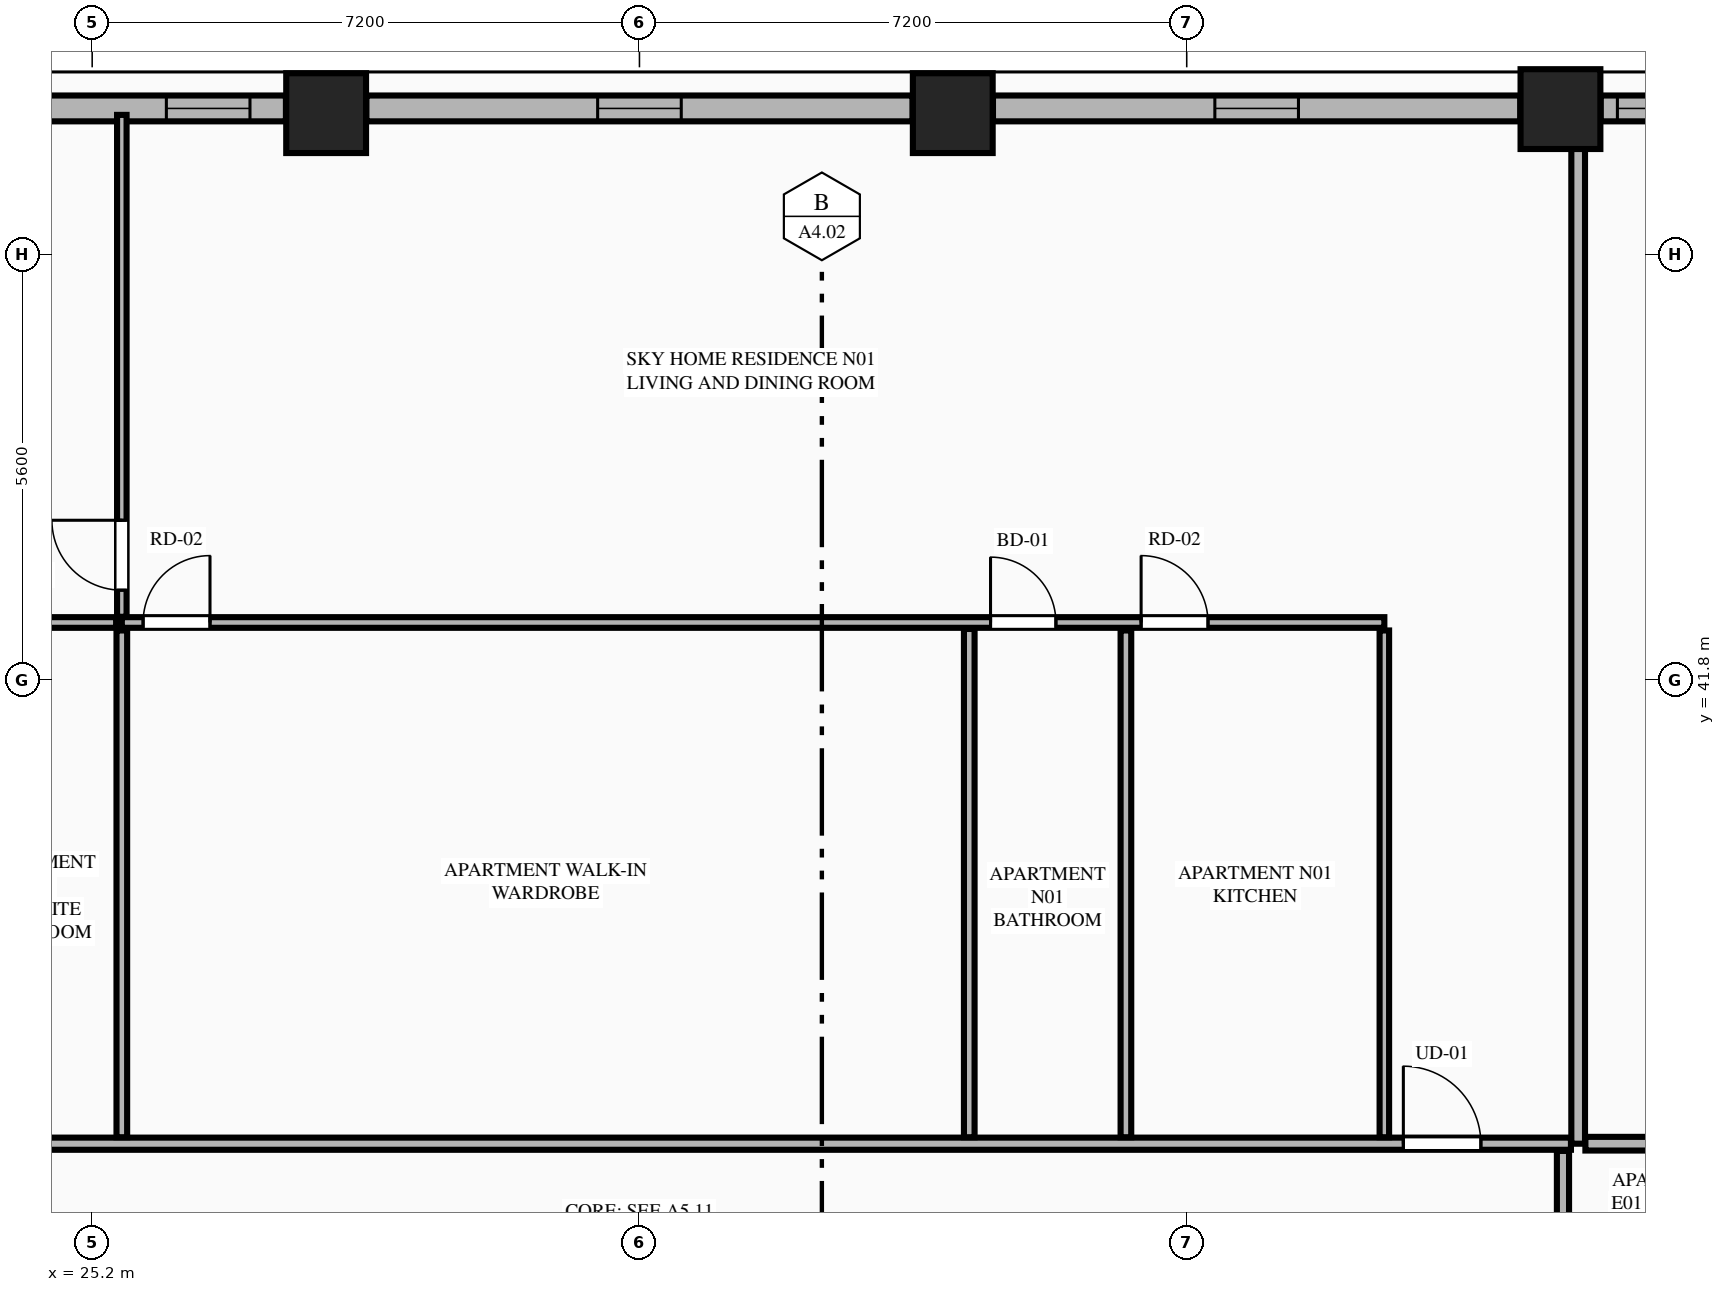
"""IFC4 building model, lengths in metres.
Left out: names, types, materials, properties, quantities, classifications, styles, units other than length and angle.
Written with IfcOpenShell. Run it as: python <this file> out.ifc"""

import sys

from ifc_helpers import new_model, si_unit, direction, frame, frame_2d, origin, origin_2d, place, context, subcontext, project, spatial, rectangle, extrude, element, fill, save


model = new_model("IFC4")
c1 = context("Model", 3, precision=1e-05, world=origin(), true_north=direction((0.0, 1.0)))
c2 = subcontext(c1, "Body", "Model", "MODEL_VIEW")
j1 = project(units=[si_unit("LENGTHUNIT", "METRE"), si_unit("PLANEANGLEUNIT", "RADIAN")], contexts=[c1])
p1 = place(None, origin())
s1 = spatial("IfcSite", under=j1, at=p1, CompositionType="ELEMENT")
p2 = place(p1, origin())
s2 = spatial("IfcBuilding", under=s1, at=p2, CompositionType="ELEMENT")
p3 = place(p2, frame((0.0, 0.0, 83.55)))
s3 = spatial("IfcBuildingStorey", under=s2, at=p3, CompositionType="ELEMENT", Elevation=83.55)
for number, where, z_axis, x_axis in (
    (1, (44.517, 49.311, 0.0), (0.0, 0.0, 1.0), (1.0, 0.0, 0.0)),
    (2, (36.522, 49.258, 0.0), (0.0, 0.0, 1.0), (1.0, 0.0, 0.0)),
    (3, (28.278, 49.258, 0.0), (0.0, 0.0, 1.0), (1.0, 0.0, 0.0)),
):
    element("IfcColumn", number, at=place(p3, frame(where, z_axis=z_axis, x_axis=x_axis)), inside=s3, PredefinedType="COLUMN", context=c2, shape_type="SweptSolid", body=[
        extrude(rectangle(XDim=1.05, YDim=1.05, at=origin_2d()), origin(), (0.0, 0.0, 1.0), 3.55),
    ])
p4 = place(p3, frame((46.366, 49.32, 0.0), z_axis=(0.0, 0.0, 1.0), x_axis=(-1.0, 0.0, 0.0)))
e4 = element("IfcWall", 4, at=p4, inside=s3, PredefinedType="STANDARD", context=c2, shape_type="SweptSolid", body=[
    extrude(rectangle(XDim=1.32, YDim=0.34, at=frame_2d((0.66, 0.0))), origin(), (0.0, 0.0, 1.0), 3.33),
])
p5 = place(p4, frame((0.22, 0.0, 0.75)))
e5 = element("IfcOpeningElement", 5, at=p5, cuts=e4, PredefinedType="OPENING", context=c2, shape_type="SweptSolid", body=[
    extrude(rectangle(XDim=0.88, YDim=2.0, at=frame_2d((0.44, 1.0))), frame((0.0, 0.18, 0.0), z_axis=(0.0, -1.0, 0.0), x_axis=(1.0, 0.0, 0.0)), (0.0, 0.0, 1.0), 0.36),
])
p6 = place(p3, frame((43.988, 49.32, 0.0), z_axis=(0.0, 0.0, 1.0), x_axis=(-1.0, 0.0, 0.0)))
e6 = element("IfcWall", 6, at=p6, inside=s3, PredefinedType="STANDARD", context=c2, shape_type="SweptSolid", body=[
    extrude(rectangle(XDim=6.937, YDim=0.34, at=frame_2d((3.469, 0.0))), origin(), (0.0, 0.0, 1.0), 2.787),
])
p7 = place(p6, frame((2.918, 0.0, 0.75)))
e7 = element("IfcOpeningElement", 7, at=p7, cuts=e6, PredefinedType="OPENING", context=c2, shape_type="SweptSolid", body=[
    extrude(rectangle(XDim=1.1, YDim=1.887, at=frame_2d((0.55, 0.943))), frame((0.0, 0.18, 0.0), z_axis=(0.0, -1.0, 0.0), x_axis=(1.0, 0.0, 0.0)), (0.0, 0.0, 1.0), 0.36),
])
p8 = place(p3, frame((35.993, 49.32, 0.0), z_axis=(0.0, 0.0, 1.0), x_axis=(-1.0, 0.0, 0.0)))
e8 = element("IfcWall", 8, at=p8, inside=s3, PredefinedType="STANDARD", context=c2, shape_type="SweptSolid", body=[
    extrude(rectangle(XDim=7.186, YDim=0.34, at=frame_2d((3.593, 0.0))), origin(), (0.0, 0.0, 1.0), 2.787),
])
p9 = place(p8, frame((3.043, 0.0, 0.75)))
e9 = element("IfcOpeningElement", 9, at=p9, cuts=e8, PredefinedType="OPENING", context=c2, shape_type="SweptSolid", body=[
    extrude(rectangle(XDim=1.1, YDim=1.887, at=frame_2d((0.55, 0.943))), frame((0.0, 0.18, 0.0), z_axis=(0.0, -1.0, 0.0), x_axis=(1.0, 0.0, 0.0)), (0.0, 0.0, 1.0), 0.36),
])
p10 = place(p3, frame((27.749, 49.32, 0.0), z_axis=(0.0, 0.0, 1.0), x_axis=(-1.0, 0.0, 0.0)))
e10 = element("IfcWall", 10, at=p10, inside=s3, PredefinedType="STANDARD", context=c2, shape_type="SweptSolid", body=[
    extrude(rectangle(XDim=6.937, YDim=0.34, at=frame_2d((3.469, 0.0))), origin(), (0.0, 0.0, 1.0), 2.787),
])
p11 = place(p10, frame((0.473, 0.0, 0.75)))
e11 = element("IfcOpeningElement", 11, at=p11, cuts=e10, PredefinedType="OPENING", context=c2, shape_type="SweptSolid", body=[
    extrude(rectangle(XDim=1.1, YDim=1.887, at=frame_2d((0.55, 0.943))), frame((0.0, 0.18, 0.0), z_axis=(0.0, -1.0, 0.0), x_axis=(1.0, 0.0, 0.0)), (0.0, 0.0, 1.0), 0.36),
])
p12 = place(p10, frame((4.054, 0.0, 0.75)))
e12 = element("IfcOpeningElement", 12, at=p12, cuts=e10, PredefinedType="OPENING", context=c2, shape_type="SweptSolid", body=[
    extrude(rectangle(XDim=1.1, YDim=1.887, at=frame_2d((0.55, 0.943))), frame((0.0, 0.18, 0.0), z_axis=(0.0, -1.0, 0.0), x_axis=(1.0, 0.0, 0.0)), (0.0, 0.0, 1.0), 0.36),
])
p13 = place(p3, frame((44.75, 35.7, 0.0), z_axis=(0.0, 0.0, 1.0), x_axis=(0.0, 1.0, 0.0)))
e13 = element("IfcWall", 13, at=p13, inside=s3, PredefinedType="PARTITIONING", context=c2, shape_type="SweptSolid", body=[
    extrude(rectangle(XDim=13.445, YDim=0.18, at=frame_2d((6.723, 0.0))), origin(), (0.0, 0.0, 1.0), 3.33),
])
p14 = place(p3, frame((20.145, 35.7, 0.0), z_axis=(0.0, 0.0, 1.0), x_axis=(1.0, 0.0, 0.0)))
e14 = element("IfcWall", 14, at=p14, inside=s3, PredefinedType="PARTITIONING", context=c2, shape_type="SweptSolid", body=[
    extrude(rectangle(XDim=24.51, YDim=0.16, at=frame_2d((12.255, 0.0))), origin(), (0.0, 0.0, 1.0), 3.33),
])
p15 = place(p14, frame((22.305, 0.0, 0.0)))
e15 = element("IfcOpeningElement", 15, at=p15, cuts=e14, PredefinedType="OPENING", context=c2, shape_type="SweptSolid", body=[
    extrude(rectangle(XDim=1.02, YDim=2.25, at=frame_2d((0.51, 1.125))), frame((0.0, 0.09, 0.0), z_axis=(0.0, -1.0, 0.0), x_axis=(1.0, 0.0, 0.0)), (0.0, 0.0, 1.0), 0.18),
])
p16 = place(p3, frame((42.2, 35.785, 0.0), z_axis=(0.0, 0.0, 1.0), x_axis=(0.0, 1.0, 0.0)))
e16 = element("IfcWall", 16, at=p16, inside=s3, PredefinedType="PARTITIONING", context=c2, shape_type="SweptSolid", body=[
    extrude(rectangle(XDim=6.667, YDim=0.125, at=frame_2d((3.333, 0.0))), origin(), (0.0, 0.0, 1.0), 2.636),
])
p17 = place(p3, frame((25.59, 42.557, 0.0), z_axis=(0.0, 0.0, 1.0), x_axis=(1.0, 0.0, 0.0)))
e17 = element("IfcWall", 17, at=p17, inside=s3, PredefinedType="PLUMBINGWALL", context=c2, shape_type="SweptSolid", body=[
    extrude(rectangle(XDim=16.61, YDim=0.14, at=frame_2d((8.305, 0.0))), origin(), (0.0, 0.0, 1.0), 3.33),
])
p18 = place(p17, frame((0.28, 0.0, 0.0)))
e18 = element("IfcOpeningElement", 18, at=p18, cuts=e17, PredefinedType="OPENING", context=c2, shape_type="SweptSolid", body=[
    extrude(rectangle(XDim=0.88, YDim=2.15, at=frame_2d((0.44, 1.075))), frame((0.0, 0.08, 0.0), z_axis=(0.0, -1.0, 0.0), x_axis=(1.0, 0.0, 0.0)), (0.0, 0.0, 1.0), 0.16),
])
p19 = place(p17, frame((11.429, 0.0, 0.0)))
e19 = element("IfcOpeningElement", 19, at=p19, cuts=e17, PredefinedType="OPENING", context=c2, shape_type="SweptSolid", body=[
    extrude(rectangle(XDim=0.86, YDim=2.1, at=frame_2d((0.43, 1.05))), frame((0.0, 0.08, 0.0), z_axis=(0.0, -1.0, 0.0), x_axis=(1.0, 0.0, 0.0)), (0.0, 0.0, 1.0), 0.16),
])
p20 = place(p17, frame((13.41, 0.0, 0.0)))
e20 = element("IfcOpeningElement", 20, at=p20, cuts=e17, PredefinedType="OPENING", context=c2, shape_type="SweptSolid", body=[
    extrude(rectangle(XDim=0.88, YDim=2.15, at=frame_2d((0.44, 1.075))), frame((0.0, 0.08, 0.0), z_axis=(0.0, -1.0, 0.0), x_axis=(1.0, 0.0, 0.0)), (0.0, 0.0, 1.0), 0.16),
])
p21 = place(p3, frame((20.145, 42.557, 0.0), z_axis=(0.0, 0.0, 1.0), x_axis=(1.0, 0.0, 0.0)))
e21 = element("IfcWall", 21, at=p21, inside=s3, PredefinedType="PLUMBINGWALL", context=c2, shape_type="SweptSolid", body=[
    extrude(rectangle(XDim=5.37, YDim=0.14, at=frame_2d((2.685, 0.0))), origin(), (0.0, 0.0, 1.0), 3.33),
])
p22 = place(p21, frame((0.28, 0.0, 0.0)))
e22 = element("IfcOpeningElement", 22, at=p22, cuts=e21, PredefinedType="OPENING", context=c2, shape_type="SweptSolid", body=[
    extrude(rectangle(XDim=0.88, YDim=2.15, at=frame_2d((0.44, 1.075))), frame((0.0, 0.08, 0.0), z_axis=(0.0, -1.0, 0.0), x_axis=(1.0, 0.0, 0.0)), (0.0, 0.0, 1.0), 0.16),
])
p23 = place(p21, frame((3.589, 0.0, 0.0)))
e23 = element("IfcOpeningElement", 23, at=p23, cuts=e21, PredefinedType="OPENING", context=c2, shape_type="SweptSolid", body=[
    extrude(rectangle(XDim=0.86, YDim=2.1, at=frame_2d((0.43, 1.05))), frame((0.0, 0.08, 0.0), z_axis=(0.0, -1.0, 0.0), x_axis=(1.0, 0.0, 0.0)), (0.0, 0.0, 1.0), 0.16),
])
for number, where, z_axis, x_axis in (
    (24, (38.8, 35.785, 0.0), (0.0, 0.0, 1.0), (0.0, 1.0, 0.0)),
    (25, (25.59, 35.785, 0.0), (0.0, 0.0, 1.0), (0.0, 1.0, 0.0)),
):
    element("IfcWall", number, at=place(p3, frame(where, z_axis=z_axis, x_axis=x_axis)), inside=s3, PredefinedType="PLUMBINGWALL", context=c2, shape_type="SweptSolid", body=[
        extrude(rectangle(XDim=6.667, YDim=0.14, at=frame_2d((3.333, 0.0))), origin(), (0.0, 0.0, 1.0), 3.33),
    ])
p24 = place(p3, frame((25.59, 42.632, 0.0), z_axis=(0.0, 0.0, 1.0), x_axis=(0.0, 1.0, 0.0)))
e26 = element("IfcWall", 26, at=p24, inside=s3, PredefinedType="PARTITIONING", context=c2, shape_type="SweptSolid", body=[
    extrude(rectangle(XDim=6.603, YDim=0.125, at=frame_2d((3.302, 0.0))), origin(), (0.0, 0.0, 1.0), 3.33),
])
p25 = place(p24, frame((0.35, 0.0, 0.0)))
e27 = element("IfcOpeningElement", 27, at=p25, cuts=e26, PredefinedType="OPENING", context=c2, shape_type="SweptSolid", body=[
    extrude(rectangle(XDim=0.92, YDim=2.15, at=frame_2d((0.46, 1.075))), frame((0.0, 0.073, 0.0), z_axis=(0.0, -1.0, 0.0), x_axis=(1.0, 0.0, 0.0)), (0.0, 0.0, 1.0), 0.145),
])
p26 = place(p3, frame((36.739, 35.785, 0.0), z_axis=(0.0, 0.0, 1.0), x_axis=(0.0, 1.0, 0.0)))
e28 = element("IfcWall", 28, at=p26, inside=s3, PredefinedType="PLUMBINGWALL", context=c2, shape_type="SweptSolid", body=[
    extrude(rectangle(XDim=6.687, YDim=0.14, at=frame_2d((3.344, 0.0))), origin(), (0.0, 0.0, 1.0), 3.33),
])
p27 = place(p3, frame((44.845, 35.7, 0.0), z_axis=(0.0, 0.0, 1.0), x_axis=(1.0, 0.0, 0.0)))
e29 = element("IfcWall", 29, at=p27, inside=s3, PredefinedType="PARTITIONING", context=c2, shape_type="SweptSolid", body=[
    extrude(rectangle(XDim=9.366, YDim=0.18, at=frame_2d((4.683, 0.0))), origin(), (0.0, 0.0, 1.0), 3.33),
])
p28 = place(p3, frame((44.55, 16.195, 0.0), z_axis=(0.0, 0.0, 1.0), x_axis=(0.0, 1.0, 0.0)))
e30 = element("IfcWall", 30, at=p28, inside=s3, PredefinedType="PARTITIONING", context=c2, shape_type="SweptSolid", body=[
    extrude(rectangle(XDim=19.41, YDim=0.16, at=frame_2d((9.705, 0.0))), origin(), (0.0, 0.0, 1.0), 2.636),
])
p29 = place(p28, frame((0.45, 0.0, 0.0)))
e31 = element("IfcOpeningElement", 31, at=p29, cuts=e30, PredefinedType="OPENING", context=c2, shape_type="SweptSolid", body=[
    extrude(rectangle(XDim=1.02, YDim=2.25, at=frame_2d((0.51, 1.125))), frame((0.0, 0.09, 0.0), z_axis=(0.0, -1.0, 0.0), x_axis=(1.0, 0.0, 0.0)), (0.0, 0.0, 1.0), 0.18),
])
p30 = place(p7, origin())
e32 = element("IfcWindow", 32, at=p30, inside=s3, PartitioningType="SINGLE_PANEL", PredefinedType="WINDOW", context=c2, shape_type="SweptSolid", body=[
    extrude(rectangle(XDim=1.1, YDim=1.887, at=frame_2d((0.55, 0.943))), frame((0.0, 0.03, 0.0), z_axis=(0.0, -1.0, 0.0), x_axis=(1.0, 0.0, 0.0)), (0.0, 0.0, 1.0), 0.06),
])
fill(e7, e32)
p31 = place(p9, origin())
e33 = element("IfcWindow", 33, at=p31, inside=s3, PartitioningType="SINGLE_PANEL", PredefinedType="WINDOW", context=c2, shape_type="SweptSolid", body=[
    extrude(rectangle(XDim=1.1, YDim=1.887, at=frame_2d((0.55, 0.943))), frame((0.0, 0.03, 0.0), z_axis=(0.0, -1.0, 0.0), x_axis=(1.0, 0.0, 0.0)), (0.0, 0.0, 1.0), 0.06),
])
fill(e9, e33)
p32 = place(p11, origin())
e34 = element("IfcWindow", 34, at=p32, inside=s3, PartitioningType="SINGLE_PANEL", PredefinedType="WINDOW", context=c2, shape_type="SweptSolid", body=[
    extrude(rectangle(XDim=1.1, YDim=1.887, at=frame_2d((0.55, 0.943))), frame((0.0, 0.03, 0.0), z_axis=(0.0, -1.0, 0.0), x_axis=(1.0, 0.0, 0.0)), (0.0, 0.0, 1.0), 0.06),
])
fill(e11, e34)
p33 = place(p18, origin())
e35 = element("IfcDoor", 35, at=p33, inside=s3, OperationType="SINGLE_SWING_RIGHT", PredefinedType="DOOR", context=c2, shape_type="SweptSolid", body=[
    extrude(rectangle(XDim=0.88, YDim=2.15, at=frame_2d((0.44, 1.075))), frame((0.0, 0.025, 0.0), z_axis=(0.0, -1.0, 0.0), x_axis=(1.0, 0.0, 0.0)), (0.0, 0.0, 1.0), 0.05),
])
fill(e18, e35)
p34 = place(p19, origin())
e36 = element("IfcDoor", 36, at=p34, inside=s3, OperationType="SINGLE_SWING_LEFT", PredefinedType="DOOR", context=c2, shape_type="SweptSolid", body=[
    extrude(rectangle(XDim=0.86, YDim=2.1, at=frame_2d((0.43, 1.05))), frame((0.0, 0.025, 0.0), z_axis=(0.0, -1.0, 0.0), x_axis=(1.0, 0.0, 0.0)), (0.0, 0.0, 1.0), 0.05),
])
fill(e19, e36)
p35 = place(p15, origin())
e37 = element("IfcDoor", 37, at=p35, inside=s3, OperationType="SINGLE_SWING_LEFT", PredefinedType="DOOR", context=c2, shape_type="SweptSolid", body=[
    extrude(rectangle(XDim=1.02, YDim=2.25, at=frame_2d((0.51, 1.125))), frame((0.0, 0.025, 0.0), z_axis=(0.0, -1.0, 0.0), x_axis=(1.0, 0.0, 0.0)), (0.0, 0.0, 1.0), 0.05),
])
fill(e15, e37)
p36 = place(p20, origin())
e38 = element("IfcDoor", 38, at=p36, inside=s3, OperationType="SINGLE_SWING_LEFT", PredefinedType="DOOR", context=c2, shape_type="SweptSolid", body=[
    extrude(rectangle(XDim=0.88, YDim=2.15, at=frame_2d((0.44, 1.075))), frame((0.0, 0.025, 0.0), z_axis=(0.0, -1.0, 0.0), x_axis=(1.0, 0.0, 0.0)), (0.0, 0.0, 1.0), 0.05),
])
fill(e20, e38)
p37 = place(p25, origin())
e39 = element("IfcDoor", 39, at=p37, inside=s3, OperationType="SINGLE_SWING_RIGHT", PredefinedType="DOOR", context=c2, shape_type="SweptSolid", body=[
    extrude(rectangle(XDim=0.92, YDim=2.15, at=frame_2d((0.46, 1.075))), frame((0.0, 0.025, 0.0), z_axis=(0.0, -1.0, 0.0), x_axis=(1.0, 0.0, 0.0)), (0.0, 0.0, 1.0), 0.05),
])
fill(e27, e39)
p38 = place(p5, origin())
e40 = element("IfcWindow", 40, at=p38, inside=s3, PartitioningType="SINGLE_PANEL", PredefinedType="WINDOW", context=c2, shape_type="SweptSolid", body=[
    extrude(rectangle(XDim=0.88, YDim=2.0, at=frame_2d((0.44, 1.0))), frame((0.0, 0.03, 0.0), z_axis=(0.0, -1.0, 0.0), x_axis=(1.0, 0.0, 0.0)), (0.0, 0.0, 1.0), 0.06),
])
fill(e5, e40)
save(model, sys.argv[1])
